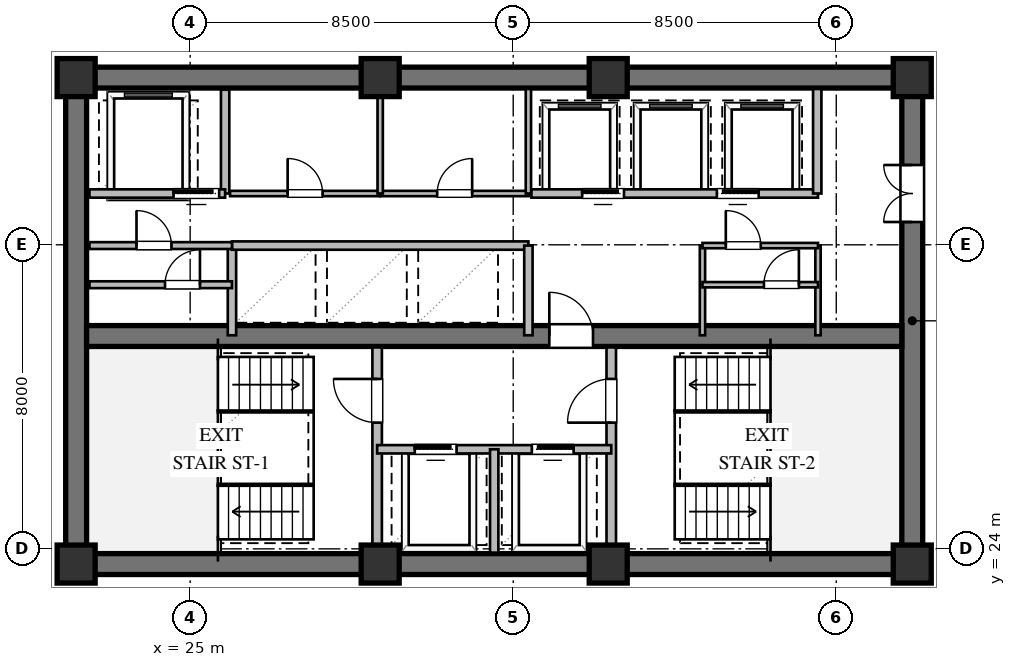
"""IFC4 building model, lengths in metres.
Left out: names, types, materials, properties, quantities, classifications, styles, units other than length and angle.
Written with IfcOpenShell. Run it as: python <this file> out.ifc"""

import sys

from ifc_helpers import new_model, si_unit, direction, frame, frame_2d, origin, origin_2d, place, context, subcontext, project, spatial, rectangle, extrude, element, fill, save


model = new_model("IFC4")
c1 = context("Model", 3, precision=1e-05, world=origin(), true_north=direction((0.0, 1.0)))
c2 = subcontext(c1, "Body", "Model", "MODEL_VIEW")
j1 = project(units=[si_unit("LENGTHUNIT", "METRE"), si_unit("PLANEANGLEUNIT", "RADIAN")], contexts=[c1])
p1 = place(None, origin())
s1 = spatial("IfcSite", under=j1, at=p1, CompositionType="ELEMENT")
p2 = place(p1, origin())
s2 = spatial("IfcBuilding", under=s1, at=p2, CompositionType="ELEMENT")
p3 = place(p2, frame((0.0, 0.0, 174.6)))
s3 = spatial("IfcBuildingStorey", under=s2, at=p3, CompositionType="ELEMENT", Elevation=174.6)
for number, where, z_axis, x_axis in (
    (1, (21.725, 23.6, 0.0), (0.0, 0.0, 1.0), (1.0, 0.0, 0.0)),
    (2, (21.725, 36.4, 0.0), (0.0, 0.0, 1.0), (1.0, 0.0, 0.0)),
):
    element("IfcWall", number, at=place(p3, frame(where, z_axis=z_axis, x_axis=x_axis)), inside=s3, PredefinedType="SHEAR", context=c2, shape_type="SweptSolid", body=[
        extrude(rectangle(XDim=22.55, YDim=0.55, at=frame_2d((11.275, 0.0))), origin(), (0.0, 0.0, 1.0), 3.36),
    ])
p4 = place(p3, frame((22.0, 23.875, 0.0), z_axis=(0.0, 0.0, 1.0), x_axis=(0.0, 1.0, 0.0)))
e3 = element("IfcWall", 3, at=p4, inside=s3, PredefinedType="SHEAR", context=c2, shape_type="SweptSolid", body=[
    extrude(rectangle(XDim=12.25, YDim=0.55, at=frame_2d((6.125, 0.0))), origin(), (0.0, 0.0, 1.0), 3.36),
])
p5 = place(p3, frame((44.0, 23.875, 0.0), z_axis=(0.0, 0.0, 1.0), x_axis=(0.0, 1.0, 0.0)))
e4 = element("IfcWall", 4, at=p5, inside=s3, PredefinedType="SHEAR", context=c2, shape_type="SweptSolid", body=[
    extrude(rectangle(XDim=12.25, YDim=0.55, at=frame_2d((6.125, 0.0))), origin(), (0.0, 0.0, 1.0), 3.36),
])
p6 = place(p5, frame((8.725, 0.0, 0.0)))
e5 = element("IfcOpeningElement", 5, at=p6, cuts=e4, PredefinedType="OPENING", context=c2, shape_type="SweptSolid", body=[
    extrude(rectangle(XDim=1.5, YDim=2.15, at=frame_2d((0.75, 1.075))), frame((0.0, 0.285, 0.0), z_axis=(0.0, -1.0, 0.0), x_axis=(1.0, 0.0, 0.0)), (0.0, 0.0, 1.0), 0.57),
])
p7 = place(p3, frame((22.275, 29.6, 0.0), z_axis=(0.0, 0.0, 1.0), x_axis=(1.0, 0.0, 0.0)))
e6 = element("IfcWall", 6, at=p7, inside=s3, PredefinedType="SHEAR", context=c2, shape_type="SweptSolid", body=[
    extrude(rectangle(XDim=21.45, YDim=0.55, at=frame_2d((10.725, 0.0))), origin(), (0.0, 0.0, 1.0), 3.36),
])
p8 = place(p7, frame((12.175, 0.0, 0.0)))
e7 = element("IfcOpeningElement", 7, at=p8, cuts=e6, PredefinedType="OPENING", context=c2, shape_type="SweptSolid", body=[
    extrude(rectangle(XDim=1.15, YDim=2.1, at=frame_2d((0.575, 1.05))), frame((0.0, 0.285, 0.0), z_axis=(0.0, -1.0, 0.0), x_axis=(1.0, 0.0, 0.0)), (0.0, 0.0, 1.0), 0.57),
])
for number, where, z_axis, x_axis in (
    (8, (22.0, 23.6, 0.0), (0.0, 0.0, 1.0), (1.0, 0.0, 0.0)),
    (9, (30.0, 23.6, 0.0), (0.0, 0.0, 1.0), (1.0, 0.0, 0.0)),
    (10, (36.0, 23.6, 0.0), (0.0, 0.0, 1.0), (1.0, 0.0, 0.0)),
    (11, (44.0, 23.6, 0.0), (0.0, 0.0, 1.0), (1.0, 0.0, 0.0)),
    (12, (44.0, 36.4, 0.0), (0.0, 0.0, 1.0), (1.0, 0.0, 0.0)),
    (13, (36.0, 36.4, 0.0), (0.0, 0.0, 1.0), (1.0, 0.0, 0.0)),
    (14, (30.0, 36.4, 0.0), (0.0, 0.0, 1.0), (1.0, 0.0, 0.0)),
    (15, (22.0, 36.4, 0.0), (0.0, 0.0, 1.0), (1.0, 0.0, 0.0)),
):
    element("IfcColumn", number, at=place(p3, frame(where, z_axis=z_axis, x_axis=x_axis)), inside=s3, PredefinedType="COLUMN", context=c2, shape_type="SweptSolid", body=[
        extrude(rectangle(XDim=1.0, YDim=1.0, at=origin_2d()), origin(), (0.0, 0.0, 1.0), 3.6),
    ])
p9 = place(p3, frame((29.92, 23.9, 0.0), z_axis=(0.0, 0.0, 1.0), x_axis=(0.0, 1.0, 0.0)))
e16 = element("IfcWall", 16, at=p9, inside=s3, PredefinedType="SOLIDWALL", context=c2, shape_type="SweptSolid", body=[
    extrude(rectangle(XDim=5.4, YDim=0.25, at=frame_2d((2.7, 0.0))), origin(), (0.0, 0.0, 1.0), 2.806),
])
p10 = place(p9, frame((3.421, 0.0, 0.0)))
e17 = element("IfcOpeningElement", 17, at=p10, cuts=e16, PredefinedType="OPENING", context=c2, shape_type="SweptSolid", body=[
    extrude(rectangle(XDim=1.15, YDim=2.1, at=frame_2d((0.575, 1.05))), frame((0.0, 0.135, 0.0), z_axis=(0.0, -1.0, 0.0), x_axis=(1.0, 0.0, 0.0)), (0.0, 0.0, 1.0), 0.27),
])
p11 = place(p3, frame((36.08, 23.9, 0.0), z_axis=(0.0, 0.0, 1.0), x_axis=(0.0, 1.0, 0.0)))
e18 = element("IfcWall", 18, at=p11, inside=s3, PredefinedType="SOLIDWALL", context=c2, shape_type="SweptSolid", body=[
    extrude(rectangle(XDim=5.4, YDim=0.25, at=frame_2d((2.7, 0.0))), origin(), (0.0, 0.0, 1.0), 3.36),
])
p12 = place(p11, frame((3.421, 0.0, 0.0)))
e19 = element("IfcOpeningElement", 19, at=p12, cuts=e18, PredefinedType="OPENING", context=c2, shape_type="SweptSolid", body=[
    extrude(rectangle(XDim=1.15, YDim=2.1, at=frame_2d((0.575, 1.05))), frame((0.0, 0.135, 0.0), z_axis=(0.0, -1.0, 0.0), x_axis=(1.0, 0.0, 0.0)), (0.0, 0.0, 1.0), 0.27),
])
p13 = place(p3, frame((29.92, 26.62, 0.0), z_axis=(0.0, 0.0, 1.0), x_axis=(1.0, 0.0, 0.0)))
e20 = element("IfcWall", 20, at=p13, inside=s3, PredefinedType="SOLIDWALL", context=c2, shape_type="SweptSolid", body=[
    extrude(rectangle(XDim=6.16, YDim=0.22, at=frame_2d((3.08, 0.0))), origin(), (0.0, 0.0, 1.0), 3.36),
])
p14 = place(p13, frame((0.99, 0.0, 0.0)))
e21 = element("IfcOpeningElement", 21, at=p14, cuts=e20, PredefinedType="OPENING", context=c2, shape_type="SweptSolid", body=[
    extrude(rectangle(XDim=1.1, YDim=2.1, at=frame_2d((0.55, 1.05))), frame((0.0, 0.12, 0.0), z_axis=(0.0, -1.0, 0.0), x_axis=(1.0, 0.0, 0.0)), (0.0, 0.0, 1.0), 0.24),
])
p15 = place(p13, frame((4.07, 0.0, 0.0)))
e22 = element("IfcOpeningElement", 22, at=p15, cuts=e20, PredefinedType="OPENING", context=c2, shape_type="SweptSolid", body=[
    extrude(rectangle(XDim=1.1, YDim=2.1, at=frame_2d((0.55, 1.05))), frame((0.0, 0.12, 0.0), z_axis=(0.0, -1.0, 0.0), x_axis=(1.0, 0.0, 0.0)), (0.0, 0.0, 1.0), 0.24),
])
p16 = place(p3, frame((33.0, 23.9, 0.0), z_axis=(0.0, 0.0, 1.0), x_axis=(0.0, 1.0, 0.0)))
e23 = element("IfcWall", 23, at=p16, inside=s3, PredefinedType="SOLIDWALL", context=c2, shape_type="SweptSolid", body=[
    extrude(rectangle(XDim=2.72, YDim=0.22, at=frame_2d((1.36, 0.0))), origin(), (0.0, 0.0, 1.0), 3.36),
])
p17 = place(p3, frame((25.92, 33.35, 0.0), z_axis=(0.0, 0.0, 1.0), x_axis=(0.0, 1.0, 0.0)))
e24 = element("IfcWall", 24, at=p17, inside=s3, PredefinedType="SOLIDWALL", context=c2, shape_type="SweptSolid", body=[
    extrude(rectangle(XDim=2.73, YDim=0.22, at=frame_2d((1.365, 0.0))), origin(), (0.0, 0.0, 1.0), 3.36),
])
p18 = place(p3, frame((22.35, 33.35, 0.0), z_axis=(0.0, 0.0, 1.0), x_axis=(1.0, 0.0, 0.0)))
e25 = element("IfcWall", 25, at=p18, inside=s3, PredefinedType="SOLIDWALL", context=c2, shape_type="SweptSolid", body=[
    extrude(rectangle(XDim=3.57, YDim=0.22, at=frame_2d((1.785, 0.0))), origin(), (0.0, 0.0, 1.0), 3.36),
])
p19 = place(p18, frame((2.213, 0.0, 0.0)))
e26 = element("IfcOpeningElement", 26, at=p19, cuts=e25, PredefinedType="OPENING", context=c2, shape_type="SweptSolid", body=[
    extrude(rectangle(XDim=1.2, YDim=2.1, at=frame_2d((0.6, 1.05))), frame((0.0, 0.12, 0.0), z_axis=(0.0, -1.0, 0.0), x_axis=(1.0, 0.0, 0.0)), (0.0, 0.0, 1.0), 0.24),
])
p20 = place(p3, frame((26.1, 29.62, 0.0), z_axis=(0.0, 0.0, 1.0), x_axis=(0.0, 1.0, 0.0)))
e27 = element("IfcWall", 27, at=p20, inside=s3, PredefinedType="SOLIDWALL", context=c2, shape_type="SweptSolid", body=[
    extrude(rectangle(XDim=2.36, YDim=0.22, at=frame_2d((1.18, 0.0))), origin(), (0.0, 0.0, 1.0), 3.36),
])
p21 = place(p3, frame((26.1, 31.98, 0.0), z_axis=(0.0, 0.0, 1.0), x_axis=(1.0, 0.0, 0.0)))
e28 = element("IfcWall", 28, at=p21, inside=s3, PredefinedType="SOLIDWALL", context=c2, shape_type="SweptSolid", body=[
    extrude(rectangle(XDim=7.8, YDim=0.22, at=frame_2d((3.9, 0.0))), origin(), (0.0, 0.0, 1.0), 3.36),
])
p22 = place(p3, frame((33.9, 29.62, 0.0), z_axis=(0.0, 0.0, 1.0), x_axis=(0.0, 1.0, 0.0)))
e29 = element("IfcWall", 29, at=p22, inside=s3, PredefinedType="SOLIDWALL", context=c2, shape_type="SweptSolid", body=[
    extrude(rectangle(XDim=2.36, YDim=0.22, at=frame_2d((1.18, 0.0))), origin(), (0.0, 0.0, 1.0), 3.36),
])
p23 = place(p3, frame((26.05, 33.35, 0.0), z_axis=(0.0, 0.0, 1.0), x_axis=(1.0, 0.0, 0.0)))
e30 = element("IfcWall", 30, at=p23, inside=s3, PredefinedType="PARTITIONING", context=c2, shape_type="SweptSolid", body=[
    extrude(rectangle(XDim=3.95, YDim=0.14, at=frame_2d((1.975, 0.0))), origin(), (0.0, 0.0, 1.0), 3.36),
])
p24 = place(p23, frame((1.515, 0.0, 0.0)))
e31 = element("IfcOpeningElement", 31, at=p24, cuts=e30, PredefinedType="OPENING", context=c2, shape_type="SweptSolid", body=[
    extrude(rectangle(XDim=0.92, YDim=2.1, at=frame_2d((0.46, 1.05))), frame((0.0, 0.08, 0.0), z_axis=(0.0, -1.0, 0.0), x_axis=(1.0, 0.0, 0.0)), (0.0, 0.0, 1.0), 0.16),
])
p25 = place(p3, frame((30.0, 33.35, 0.0), z_axis=(0.0, 0.0, 1.0), x_axis=(1.0, 0.0, 0.0)))
e32 = element("IfcWall", 32, at=p25, inside=s3, PredefinedType="PARTITIONING", context=c2, shape_type="SweptSolid", body=[
    extrude(rectangle(XDim=3.92, YDim=0.14, at=frame_2d((1.96, 0.0))), origin(), (0.0, 0.0, 1.0), 3.36),
])
p26 = place(p25, frame((1.5, 0.0, 0.0)))
e33 = element("IfcOpeningElement", 33, at=p26, cuts=e32, PredefinedType="OPENING", context=c2, shape_type="SweptSolid", body=[
    extrude(rectangle(XDim=0.92, YDim=2.1, at=frame_2d((0.46, 1.05))), frame((0.0, 0.08, 0.0), z_axis=(0.0, -1.0, 0.0), x_axis=(1.0, 0.0, 0.0)), (0.0, 0.0, 1.0), 0.16),
])
for number, where, z_axis, x_axis in (
    (34, (30.0, 33.35, 0.0), (0.0, 0.0, 1.0), (0.0, 1.0, 0.0)),
    (35, (33.9, 33.35, 0.0), (0.0, 0.0, 1.0), (0.0, 1.0, 0.0)),
):
    element("IfcWall", number, at=place(p3, frame(where, z_axis=z_axis, x_axis=x_axis)), inside=s3, PredefinedType="PARTITIONING", context=c2, shape_type="SweptSolid", body=[
        extrude(rectangle(XDim=2.75, YDim=0.14, at=frame_2d((1.375, 0.0))), origin(), (0.0, 0.0, 1.0), 3.36),
    ])
p27 = place(p3, frame((33.98, 33.35, 0.0), z_axis=(0.0, 0.0, 1.0), x_axis=(1.0, 0.0, 0.0)))
e36 = element("IfcWall", 36, at=p27, inside=s3, PredefinedType="SOLIDWALL", context=c2, shape_type="SweptSolid", body=[
    extrude(rectangle(XDim=7.54, YDim=0.22, at=frame_2d((3.77, 0.0))), origin(), (0.0, 0.0, 1.0), 3.36),
])
p28 = place(p27, frame((1.335, 0.0, 0.0)))
e37 = element("IfcOpeningElement", 37, at=p28, cuts=e36, PredefinedType="OPENING", context=c2, shape_type="SweptSolid", body=[
    extrude(rectangle(XDim=1.1, YDim=2.1, at=frame_2d((0.55, 1.05))), frame((0.0, 0.12, 0.0), z_axis=(0.0, -1.0, 0.0), x_axis=(1.0, 0.0, 0.0)), (0.0, 0.0, 1.0), 0.24),
])
p29 = place(p27, frame((4.879, 0.0, 0.0)))
e38 = element("IfcOpeningElement", 38, at=p29, cuts=e36, PredefinedType="OPENING", context=c2, shape_type="SweptSolid", body=[
    extrude(rectangle(XDim=1.1, YDim=2.1, at=frame_2d((0.55, 1.05))), frame((0.0, 0.12, 0.0), z_axis=(0.0, -1.0, 0.0), x_axis=(1.0, 0.0, 0.0)), (0.0, 0.0, 1.0), 0.24),
])
p30 = place(p3, frame((41.5, 33.35, 0.0), z_axis=(0.0, 0.0, 1.0), x_axis=(0.0, 1.0, 0.0)))
e39 = element("IfcWall", 39, at=p30, inside=s3, PredefinedType="SOLIDWALL", context=c2, shape_type="SweptSolid", body=[
    extrude(rectangle(XDim=2.75, YDim=0.22, at=frame_2d((1.375, 0.0))), origin(), (0.0, 0.0, 1.0), 3.36),
])
p31 = place(p3, frame((22.35, 30.95, 0.0), z_axis=(0.0, 0.0, 1.0), x_axis=(1.0, 0.0, 0.0)))
e40 = element("IfcWall", 40, at=p31, inside=s3, PredefinedType="PARTITIONING", context=c2, shape_type="SweptSolid", body=[
    extrude(rectangle(XDim=3.75, YDim=0.18, at=frame_2d((1.875, 0.0))), origin(), (0.0, 0.0, 1.0), 3.36),
])
p32 = place(p31, frame((1.988, 0.0, 0.0)))
e41 = element("IfcOpeningElement", 41, at=p32, cuts=e40, PredefinedType="OPENING", context=c2, shape_type="SweptSolid", body=[
    extrude(rectangle(XDim=0.92, YDim=2.1, at=frame_2d((0.46, 1.05))), frame((0.0, 0.1, 0.0), z_axis=(0.0, -1.0, 0.0), x_axis=(1.0, 0.0, 0.0)), (0.0, 0.0, 1.0), 0.2),
])
p33 = place(p3, frame((22.35, 31.98, 0.0), z_axis=(0.0, 0.0, 1.0), x_axis=(1.0, 0.0, 0.0)))
e42 = element("IfcWall", 42, at=p33, inside=s3, PredefinedType="PARTITIONING", context=c2, shape_type="SweptSolid", body=[
    extrude(rectangle(XDim=3.75, YDim=0.18, at=frame_2d((1.875, 0.0))), origin(), (0.0, 0.0, 1.0), 3.36),
])
p34 = place(p33, frame((1.238, 0.0, 0.0)))
e43 = element("IfcOpeningElement", 43, at=p34, cuts=e42, PredefinedType="OPENING", context=c2, shape_type="SweptSolid", body=[
    extrude(rectangle(XDim=0.92, YDim=2.1, at=frame_2d((0.46, 1.05))), frame((0.0, 0.1, 0.0), z_axis=(0.0, -1.0, 0.0), x_axis=(1.0, 0.0, 0.0)), (0.0, 0.0, 1.0), 0.2),
])
for number, where, z_axis, x_axis in (
    (44, (38.48, 29.62, 0.0), (0.0, 0.0, 1.0), (0.0, 1.0, 0.0)),
    (45, (41.52, 29.62, 0.0), (0.0, 0.0, 1.0), (0.0, 1.0, 0.0)),
):
    element("IfcWall", number, at=place(p3, frame(where, z_axis=z_axis, x_axis=x_axis)), inside=s3, PredefinedType="PARTITIONING", context=c2, shape_type="SweptSolid", body=[
        extrude(rectangle(XDim=2.36, YDim=0.14, at=frame_2d((1.18, 0.0))), origin(), (0.0, 0.0, 1.0), 3.36),
    ])
p35 = place(p3, frame((38.48, 30.95, 0.0), z_axis=(0.0, 0.0, 1.0), x_axis=(1.0, 0.0, 0.0)))
e46 = element("IfcWall", 46, at=p35, inside=s3, PredefinedType="PARTITIONING", context=c2, shape_type="SweptSolid", body=[
    extrude(rectangle(XDim=3.04, YDim=0.14, at=frame_2d((1.52, 0.0))), origin(), (0.0, 0.0, 1.0), 3.36),
])
p36 = place(p35, frame((1.617, 0.0, 0.0)))
e47 = element("IfcOpeningElement", 47, at=p36, cuts=e46, PredefinedType="OPENING", context=c2, shape_type="SweptSolid", body=[
    extrude(rectangle(XDim=0.92, YDim=2.1, at=frame_2d((0.46, 1.05))), frame((0.0, 0.08, 0.0), z_axis=(0.0, -1.0, 0.0), x_axis=(1.0, 0.0, 0.0)), (0.0, 0.0, 1.0), 0.16),
])
p37 = place(p3, frame((38.48, 31.98, 0.0), z_axis=(0.0, 0.0, 1.0), x_axis=(1.0, 0.0, 0.0)))
e48 = element("IfcWall", 48, at=p37, inside=s3, PredefinedType="PARTITIONING", context=c2, shape_type="SweptSolid", body=[
    extrude(rectangle(XDim=3.04, YDim=0.14, at=frame_2d((1.52, 0.0))), origin(), (0.0, 0.0, 1.0), 3.36),
])
p38 = place(p37, frame((0.614, 0.0, 0.0)))
e49 = element("IfcOpeningElement", 49, at=p38, cuts=e48, PredefinedType="OPENING", context=c2, shape_type="SweptSolid", body=[
    extrude(rectangle(XDim=0.92, YDim=2.1, at=frame_2d((0.46, 1.05))), frame((0.0, 0.08, 0.0), z_axis=(0.0, -1.0, 0.0), x_axis=(1.0, 0.0, 0.0)), (0.0, 0.0, 1.0), 0.16),
])
p39 = place(p10, origin())
e50 = element("IfcDoor", 50, at=p39, inside=s3, OperationType="SINGLE_SWING_RIGHT", PredefinedType="DOOR", context=c2, shape_type="SweptSolid", body=[
    extrude(rectangle(XDim=1.15, YDim=2.1, at=frame_2d((0.575, 1.05))), frame((0.0, 0.025, 0.0), z_axis=(0.0, -1.0, 0.0), x_axis=(1.0, 0.0, 0.0)), (0.0, 0.0, 1.0), 0.05),
])
fill(e17, e50)
p40 = place(p12, origin())
e51 = element("IfcDoor", 51, at=p40, inside=s3, OperationType="SINGLE_SWING_LEFT", PredefinedType="DOOR", context=c2, shape_type="SweptSolid", body=[
    extrude(rectangle(XDim=1.15, YDim=2.1, at=frame_2d((0.575, 1.05))), frame((0.0, 0.025, 0.0), z_axis=(0.0, -1.0, 0.0), x_axis=(1.0, 0.0, 0.0)), (0.0, 0.0, 1.0), 0.05),
])
fill(e19, e51)
p41 = place(p14, origin())
e52 = element("IfcDoor", 52, at=p41, inside=s3, OperationType="SLIDING_TO_LEFT", PredefinedType="DOOR", context=c2, shape_type="SweptSolid", body=[
    extrude(rectangle(XDim=1.1, YDim=2.1, at=frame_2d((0.55, 1.05))), frame((0.0, 0.025, 0.0), z_axis=(0.0, -1.0, 0.0), x_axis=(1.0, 0.0, 0.0)), (0.0, 0.0, 1.0), 0.05),
])
fill(e21, e52)
p42 = place(p15, origin())
e53 = element("IfcDoor", 53, at=p42, inside=s3, OperationType="SLIDING_TO_RIGHT", PredefinedType="DOOR", context=c2, shape_type="SweptSolid", body=[
    extrude(rectangle(XDim=1.1, YDim=2.1, at=frame_2d((0.55, 1.05))), frame((0.0, 0.025, 0.0), z_axis=(0.0, -1.0, 0.0), x_axis=(1.0, 0.0, 0.0)), (0.0, 0.0, 1.0), 0.05),
])
fill(e22, e53)
p43 = place(p8, origin())
e54 = element("IfcDoor", 54, at=p43, inside=s3, OperationType="SINGLE_SWING_LEFT", PredefinedType="DOOR", context=c2, shape_type="SweptSolid", body=[
    extrude(rectangle(XDim=1.15, YDim=2.1, at=frame_2d((0.575, 1.05))), frame((0.0, 0.025, 0.0), z_axis=(0.0, -1.0, 0.0), x_axis=(1.0, 0.0, 0.0)), (0.0, 0.0, 1.0), 0.05),
])
fill(e7, e54)
p44 = place(p6, origin())
e55 = element("IfcDoor", 55, at=p44, inside=s3, OperationType="DOUBLE_DOOR_SINGLE_SWING", PredefinedType="DOOR", context=c2, shape_type="SweptSolid", body=[
    extrude(rectangle(XDim=1.5, YDim=2.15, at=frame_2d((0.75, 1.075))), frame((0.0, 0.025, 0.0), z_axis=(0.0, -1.0, 0.0), x_axis=(1.0, 0.0, 0.0)), (0.0, 0.0, 1.0), 0.05),
])
fill(e5, e55)
p45 = place(p19, origin())
e56 = element("IfcDoor", 56, at=p45, inside=s3, OperationType="SLIDING_TO_LEFT", PredefinedType="DOOR", context=c2, shape_type="SweptSolid", body=[
    extrude(rectangle(XDim=1.2, YDim=2.1, at=frame_2d((0.6, 1.05))), frame((0.0, 0.025, 0.0), z_axis=(0.0, -1.0, 0.0), x_axis=(1.0, 0.0, 0.0)), (0.0, 0.0, 1.0), 0.05),
])
fill(e26, e56)
p46 = place(p24, origin())
e57 = element("IfcDoor", 57, at=p46, inside=s3, OperationType="SINGLE_SWING_LEFT", PredefinedType="DOOR", context=c2, shape_type="SweptSolid", body=[
    extrude(rectangle(XDim=0.92, YDim=2.1, at=frame_2d((0.46, 1.05))), frame((0.0, 0.025, 0.0), z_axis=(0.0, -1.0, 0.0), x_axis=(1.0, 0.0, 0.0)), (0.0, 0.0, 1.0), 0.05),
])
fill(e31, e57)
p47 = place(p26, origin())
e58 = element("IfcDoor", 58, at=p47, inside=s3, OperationType="SINGLE_SWING_RIGHT", PredefinedType="DOOR", context=c2, shape_type="SweptSolid", body=[
    extrude(rectangle(XDim=0.92, YDim=2.1, at=frame_2d((0.46, 1.05))), frame((0.0, 0.025, 0.0), z_axis=(0.0, -1.0, 0.0), x_axis=(1.0, 0.0, 0.0)), (0.0, 0.0, 1.0), 0.05),
])
fill(e33, e58)
p48 = place(p28, origin())
e59 = element("IfcDoor", 59, at=p48, inside=s3, OperationType="SLIDING_TO_LEFT", PredefinedType="DOOR", context=c2, shape_type="SweptSolid", body=[
    extrude(rectangle(XDim=1.1, YDim=2.1, at=frame_2d((0.55, 1.05))), frame((0.0, 0.025, 0.0), z_axis=(0.0, -1.0, 0.0), x_axis=(1.0, 0.0, 0.0)), (0.0, 0.0, 1.0), 0.05),
])
fill(e37, e59)
p49 = place(p29, origin())
e60 = element("IfcDoor", 60, at=p49, inside=s3, OperationType="SLIDING_TO_RIGHT", PredefinedType="DOOR", context=c2, shape_type="SweptSolid", body=[
    extrude(rectangle(XDim=1.1, YDim=2.1, at=frame_2d((0.55, 1.05))), frame((0.0, 0.025, 0.0), z_axis=(0.0, -1.0, 0.0), x_axis=(1.0, 0.0, 0.0)), (0.0, 0.0, 1.0), 0.05),
])
fill(e38, e60)
p50 = place(p34, origin())
e61 = element("IfcDoor", 61, at=p50, inside=s3, OperationType="SINGLE_SWING_LEFT", PredefinedType="DOOR", context=c2, shape_type="SweptSolid", body=[
    extrude(rectangle(XDim=0.92, YDim=2.1, at=frame_2d((0.46, 1.05))), frame((0.0, 0.025, 0.0), z_axis=(0.0, -1.0, 0.0), x_axis=(1.0, 0.0, 0.0)), (0.0, 0.0, 1.0), 0.05),
])
fill(e43, e61)
p51 = place(p32, origin())
e62 = element("IfcDoor", 62, at=p51, inside=s3, OperationType="SINGLE_SWING_RIGHT", PredefinedType="DOOR", context=c2, shape_type="SweptSolid", body=[
    extrude(rectangle(XDim=0.92, YDim=2.1, at=frame_2d((0.46, 1.05))), frame((0.0, 0.025, 0.0), z_axis=(0.0, -1.0, 0.0), x_axis=(1.0, 0.0, 0.0)), (0.0, 0.0, 1.0), 0.05),
])
fill(e41, e62)
p52 = place(p38, origin())
e63 = element("IfcDoor", 63, at=p52, inside=s3, OperationType="SINGLE_SWING_LEFT", PredefinedType="DOOR", context=c2, shape_type="SweptSolid", body=[
    extrude(rectangle(XDim=0.92, YDim=2.1, at=frame_2d((0.46, 1.05))), frame((0.0, 0.025, 0.0), z_axis=(0.0, -1.0, 0.0), x_axis=(1.0, 0.0, 0.0)), (0.0, 0.0, 1.0), 0.05),
])
fill(e49, e63)
p53 = place(p36, origin())
e64 = element("IfcDoor", 64, at=p53, inside=s3, OperationType="SINGLE_SWING_RIGHT", PredefinedType="DOOR", context=c2, shape_type="SweptSolid", body=[
    extrude(rectangle(XDim=0.92, YDim=2.1, at=frame_2d((0.46, 1.05))), frame((0.0, 0.025, 0.0), z_axis=(0.0, -1.0, 0.0), x_axis=(1.0, 0.0, 0.0)), (0.0, 0.0, 1.0), 0.05),
])
fill(e47, e64)
save(model, sys.argv[1])
